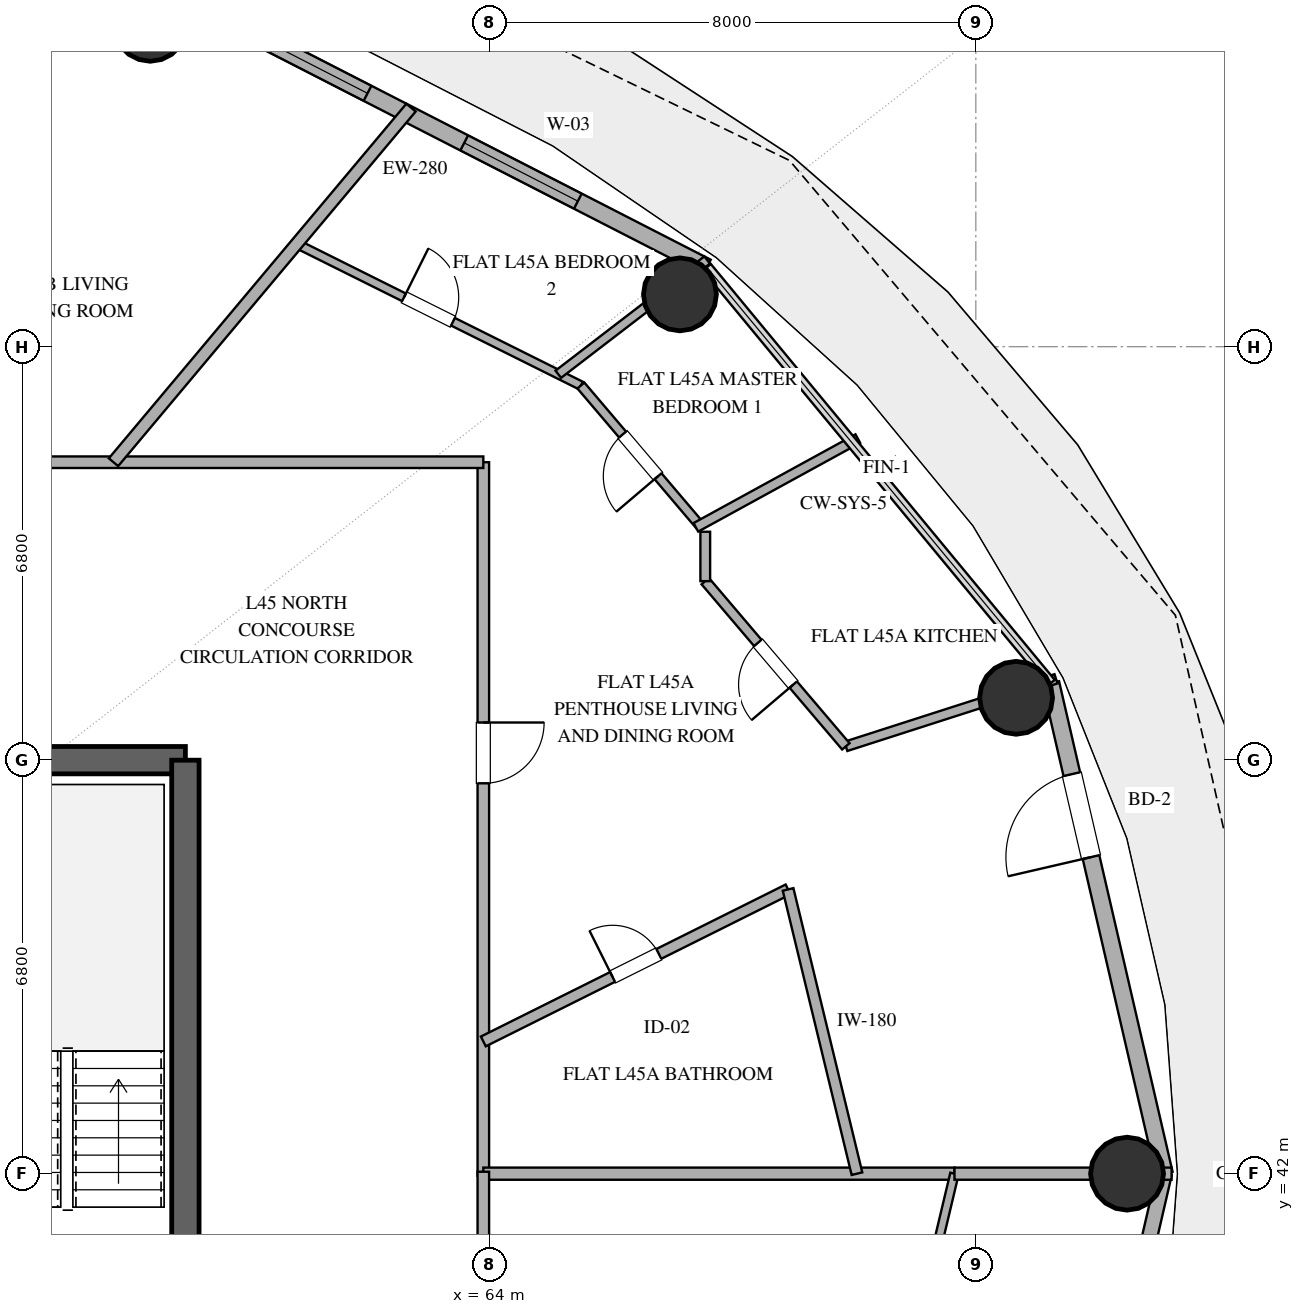
"""IFC4 building model, lengths in metres.
Left out: names, types, materials, properties, quantities, classifications, styles, units other than length and angle.
Written with IfcOpenShell. Run it as: python <this file> out.ifc"""

import sys

from ifc_helpers import new_model, si_unit, direction, frame, frame_2d, origin, origin_2d, place, context, subcontext, project, spatial, rectangle, hollow_circle, extrude, element, fill, save


model = new_model("IFC4")
c1 = context("Model", 3, precision=1e-05, world=origin(), true_north=direction((0.0, 1.0)))
c2 = subcontext(c1, "Body", "Model", "MODEL_VIEW")
j1 = project(units=[si_unit("LENGTHUNIT", "METRE"), si_unit("PLANEANGLEUNIT", "RADIAN")], contexts=[c1])
p1 = place(None, origin())
s1 = spatial("IfcSite", under=j1, at=p1, CompositionType="ELEMENT")
p2 = place(p1, origin())
s2 = spatial("IfcBuilding", under=s1, at=p2, CompositionType="ELEMENT")
p3 = place(p2, frame((0.0, 0.0, 179.4)))
s3 = spatial("IfcBuildingStorey", under=s2, at=p3, CompositionType="ELEMENT", Elevation=179.4)
p4 = place(p3, frame((55.0, 48.8, 0.0), z_axis=(0.0, 0.0, 1.0), x_axis=(1.0, 0.0, 0.0)))
e1 = element("IfcWall", 1, at=p4, inside=s3, PredefinedType="SHEAR", context=c2, shape_type="SweptSolid", body=[
    extrude(rectangle(XDim=4.0, YDim=0.45, at=frame_2d((2.0, 0.0))), origin(), (0.0, 0.0, 1.0), 3.38),
])
p5 = place(p3, frame((59.0, 35.2, 0.0), z_axis=(0.0, 0.0, 1.0), x_axis=(0.0, 1.0, 0.0)))
e2 = element("IfcWall", 2, at=p5, inside=s3, PredefinedType="SHEAR", context=c2, shape_type="SweptSolid", body=[
    extrude(rectangle(XDim=13.6, YDim=0.45, at=frame_2d((6.8, 0.0))), origin(), (0.0, 0.0, 1.0), 3.38),
])
for number, where, z_axis, x_axis in (
    (3, (74.487, 42.0, 0.0), (0.0, 0.0, 1.0), (1.0, 0.0, 0.0)),
    (4, (72.662, 49.826, 0.0), (0.0, 0.0, 1.0), (1.0, 0.0, 0.0)),
    (5, (67.134, 56.46, 0.0), (0.0, 0.0, 1.0), (1.0, 0.0, 0.0)),
    (6, (58.422, 60.893, 0.0), (0.0, 0.0, 1.0), (1.0, 0.0, 0.0)),
):
    element("IfcColumn", number, at=place(p3, frame(where, z_axis=z_axis, x_axis=x_axis)), inside=s3, PredefinedType="COLUMN", context=c2, shape_type="SweptSolid", body=[
        extrude(hollow_circle(Radius=0.6, WallThickness=0.032, at=origin_2d()), origin(), (0.0, 0.0, 1.0), 3.38),
    ])
p6 = place(p3, frame((75.099, 42.0, 0.0), z_axis=(0.0, 0.0, 1.0), x_axis=(-0.225473184558, 0.974249374157, 0.0)))
e7 = element("IfcWall", 7, at=p6, inside=s3, PredefinedType="SOLIDWALL", context=c2, shape_type="SweptSolid", body=[
    extrude(rectangle(XDim=8.28, YDim=0.28, at=frame_2d((4.14, 0.0))), origin(), (0.0, 0.0, 1.0), 3.38),
])
p7 = place(p6, frame((5.344, 0.0, 0.0)))
e8 = element("IfcOpeningElement", 8, at=p7, cuts=e7, PredefinedType="OPENING", context=c2, shape_type="SweptSolid", body=[
    extrude(rectangle(XDim=1.4, YDim=2.2, at=frame_2d((0.7, 1.1))), frame((0.0, 0.15, 0.0), z_axis=(0.0, -1.0, 0.0), x_axis=(1.0, 0.0, 0.0)), (0.0, 0.0, 1.0), 0.3),
])
p8 = place(p3, frame((67.576, 56.906, 0.0), z_axis=(0.0, 0.0, 1.0), x_axis=(-0.889872523182, 0.456209263919, 0.0)))
e9 = element("IfcWall", 9, at=p8, inside=s3, PredefinedType="SOLIDWALL", context=c2, shape_type="SweptSolid", body=[
    extrude(rectangle(XDim=10.016, YDim=0.28, at=frame_2d((5.008, 0.0))), origin(), (0.0, 0.0, 1.0), 3.38),
])
p9 = place(p8, frame((2.384, 0.0, 0.85)))
e10 = element("IfcOpeningElement", 10, at=p9, cuts=e9, PredefinedType="OPENING", context=c2, shape_type="SweptSolid", body=[
    extrude(rectangle(XDim=2.1, YDim=2.2, at=frame_2d((1.05, 1.1))), frame((0.0, 0.15, 0.0), z_axis=(0.0, -1.0, 0.0), x_axis=(1.0, 0.0, 0.0)), (0.0, 0.0, 1.0), 0.3),
])
p10 = place(p8, frame((6.271, 0.0, 0.85)))
e11 = element("IfcOpeningElement", 11, at=p10, cuts=e9, PredefinedType="OPENING", context=c2, shape_type="SweptSolid", body=[
    extrude(rectangle(XDim=1.8, YDim=2.2, at=frame_2d((0.9, 1.1))), frame((0.0, 0.15, 0.0), z_axis=(0.0, -1.0, 0.0), x_axis=(1.0, 0.0, 0.0)), (0.0, 0.0, 1.0), 0.3),
])
p11 = place(p3, frame((73.232, 33.933, 0.0), z_axis=(0.0, 0.0, 1.0), x_axis=(0.225473184558, 0.974249374157, 0.0)))
e12 = element("IfcWall", 12, at=p11, inside=s3, PredefinedType="SOLIDWALL", context=c2, shape_type="SweptSolid", body=[
    extrude(rectangle(XDim=8.28, YDim=0.25, at=frame_2d((4.14, 0.0))), origin(), (0.0, 0.0, 1.0), 3.38),
])
p12 = place(p11, frame((5.481, 0.0, 1.42)))
e13 = element("IfcOpeningElement", 13, at=p12, cuts=e12, PredefinedType="OPENING", context=c2, shape_type="SweptSolid", body=[
    extrude(rectangle(XDim=1.0, YDim=1.05, at=frame_2d((0.5, 0.525))), frame((0.0, 0.135, 0.0), z_axis=(0.0, -1.0, 0.0), x_axis=(1.0, 0.0, 0.0)), (0.0, 0.0, 1.0), 0.27),
])
p13 = place(p3, frame((63.9, 53.7, 0.0), z_axis=(0.0, 0.0, 1.0), x_axis=(0.0, -1.0, 0.0)))
e14 = element("IfcWall", 14, at=p13, inside=s3, PredefinedType="PARTITIONING", context=c2, shape_type="SweptSolid", body=[
    extrude(rectangle(XDim=11.732, YDim=0.19, at=frame_2d((5.866, 0.0))), origin(), (0.0, 0.0, 1.0), 2.74),
])
p14 = place(p13, frame((4.281, 0.0, 0.0)))
e15 = element("IfcOpeningElement", 15, at=p14, cuts=e14, PredefinedType="OPENING", context=c2, shape_type="SweptSolid", body=[
    extrude(rectangle(XDim=1.0, YDim=2.2, at=frame_2d((0.5, 1.1))), frame((0.0, 0.105, 0.0), z_axis=(0.0, -1.0, 0.0), x_axis=(1.0, 0.0, 0.0)), (0.0, 0.0, 1.0), 0.21),
])
p15 = place(p3, frame((48.092, 53.7, 0.0), z_axis=(0.0, 0.0, 1.0), x_axis=(1.0, 0.0, 0.0)))
e16 = element("IfcWall", 16, at=p15, inside=s3, PredefinedType="PARTITIONING", context=c2, shape_type="SweptSolid", body=[
    extrude(rectangle(XDim=15.808, YDim=0.19, at=frame_2d((7.904, 0.0))), origin(), (0.0, 0.0, 1.0), 2.74),
])
p16 = place(p15, frame((6.109, 0.0, 0.0)))
e17 = element("IfcOpeningElement", 17, at=p16, cuts=e16, PredefinedType="OPENING", context=c2, shape_type="SweptSolid", body=[
    extrude(rectangle(XDim=1.0, YDim=2.2, at=frame_2d((0.5, 1.1))), frame((0.0, 0.105, 0.0), z_axis=(0.0, -1.0, 0.0), x_axis=(1.0, 0.0, 0.0)), (0.0, 0.0, 1.0), 0.21),
])
p17 = place(p3, frame((63.9, 42.0, 0.0), z_axis=(0.0, 0.0, 1.0), x_axis=(1.0, 0.0, 0.0)))
e18 = element("IfcWall", 18, at=p17, inside=s3, PredefinedType="PARTITIONING", context=c2, shape_type="SweptSolid", body=[
    extrude(rectangle(XDim=7.749, YDim=0.2, at=frame_2d((3.875, 0.0))), origin(), (0.0, 0.0, 1.0), 2.74),
])
p18 = place(p3, frame((63.9, 42.032, 0.0), z_axis=(0.0, 0.0, 1.0), x_axis=(0.0, -1.0, 0.0)))
e19 = element("IfcWall", 19, at=p18, inside=s3, PredefinedType="PARTITIONING", context=c2, shape_type="SweptSolid", body=[
    extrude(rectangle(XDim=11.732, YDim=0.19, at=frame_2d((5.866, 0.0))), origin(), (0.0, 0.0, 1.0), 2.74),
])
p19 = place(p3, frame((71.649, 42.0, 0.0), z_axis=(0.0, 0.0, 1.0), x_axis=(-0.231658068135, -0.972797275627, 0.0)))
e20 = element("IfcWall", 20, at=p19, inside=s3, PredefinedType="PARTITIONING", context=c2, shape_type="SweptSolid", body=[
    extrude(rectangle(XDim=7.034, YDim=0.14, at=frame_2d((3.517, 0.0))), origin(), (0.0, 0.0, 1.0), 2.74),
])
p20 = place(p19, frame((2.427, 0.0, 0.0)))
e21 = element("IfcOpeningElement", 21, at=p20, cuts=e20, PredefinedType="OPENING", context=c2, shape_type="SweptSolid", body=[
    extrude(rectangle(XDim=0.9, YDim=2.1, at=frame_2d((0.45, 1.05))), frame((0.0, 0.08, 0.0), z_axis=(0.0, -1.0, 0.0), x_axis=(1.0, 0.0, 0.0)), (0.0, 0.0, 1.0), 0.16),
])
p21 = place(p3, frame((63.9, 44.175, 0.0), z_axis=(0.0, 0.0, 1.0), x_axis=(0.894853920946, 0.446359115699, 0.0)))
e22 = element("IfcWall", 22, at=p21, inside=s3, PredefinedType="PLUMBINGWALL", context=c2, shape_type="SweptSolid", body=[
    extrude(rectangle(XDim=5.601, YDim=0.18, at=frame_2d((2.801, 0.0))), origin(), (0.0, 0.0, 1.0), 2.74),
])
p22 = place(p21, frame((2.375, 0.0, 0.0)))
e23 = element("IfcOpeningElement", 23, at=p22, cuts=e22, PredefinedType="OPENING", context=c2, shape_type="SweptSolid", body=[
    extrude(rectangle(XDim=0.85, YDim=2.1, at=frame_2d((0.425, 1.05))), frame((0.0, 0.1, 0.0), z_axis=(0.0, -1.0, 0.0), x_axis=(1.0, 0.0, 0.0)), (0.0, 0.0, 1.0), 0.2),
])
p23 = place(p3, frame((60.831, 57.291, 0.0), z_axis=(0.0, 0.0, 1.0), x_axis=(0.894950159382, -0.446166126261, 0.0)))
e24 = element("IfcWall", 24, at=p23, inside=s3, PredefinedType="PARTITIONING", context=c2, shape_type="SweptSolid", body=[
    extrude(rectangle(XDim=5.222, YDim=0.14, at=frame_2d((2.611, 0.0))), origin(), (0.0, 0.0, 1.0), 2.74),
])
p24 = place(p23, frame((1.971, 0.0, 0.0)))
e25 = element("IfcOpeningElement", 25, at=p24, cuts=e24, PredefinedType="OPENING", context=c2, shape_type="SweptSolid", body=[
    extrude(rectangle(XDim=0.9, YDim=2.1, at=frame_2d((0.45, 1.05))), frame((0.0, 0.08, 0.0), z_axis=(0.0, -1.0, 0.0), x_axis=(1.0, 0.0, 0.0)), (0.0, 0.0, 1.0), 0.16),
])
p25 = place(p3, frame((68.912, 46.675, 0.0), z_axis=(0.0, 0.0, 1.0), x_axis=(0.235459111302, -0.97188425592, 0.0)))
e26 = element("IfcWall", 26, at=p25, inside=s3, PredefinedType="PLUMBINGWALL", context=c2, shape_type="SweptSolid", body=[
    extrude(rectangle(XDim=4.81, YDim=0.18, at=frame_2d((2.405, 0.0))), origin(), (0.0, 0.0, 1.0), 2.74),
])
p26 = place(p3, frame((62.711, 59.531, 0.0), z_axis=(0.0, 0.0, 1.0), x_axis=(-0.642792619699, -0.766040239192, 0.0)))
e27 = element("IfcWall", 27, at=p26, inside=s3, PredefinedType="PARTITIONING", context=c2, shape_type="SweptSolid", body=[
    extrude(rectangle(XDim=7.613, YDim=0.2, at=frame_2d((3.806, 0.0))), origin(), (0.0, 0.0, 1.0), 2.74),
])
p27 = place(p3, frame((73.318, 50.138, 0.0), z_axis=(0.0, 0.0, 1.0), x_axis=(-0.95200546613, -0.306081022703, 0.0)))
e28 = element("IfcWall", 28, at=p27, inside=s3, PredefinedType="PLUMBINGWALL", context=c2, shape_type="SweptSolid", body=[
    extrude(rectangle(XDim=3.63, YDim=0.16, at=frame_2d((1.815, 0.0))), origin(), (0.0, 0.0, 1.0), 2.74),
])
p28 = place(p3, frame((71.649, 42.0, 0.0), z_axis=(0.0, 0.0, 1.0), x_axis=(1.0, 0.0, 0.0)))
e29 = element("IfcWall", 29, at=p28, inside=s3, PredefinedType="PARTITIONING", context=c2, shape_type="SweptSolid", body=[
    extrude(rectangle(XDim=3.571, YDim=0.2, at=frame_2d((1.785, 0.0))), origin(), (0.0, 0.0, 1.0), 2.74),
])
p29 = place(p3, frame((69.862, 49.027, 0.0), z_axis=(0.0, 0.0, 1.0), x_axis=(-0.648065435441, 0.761584658057, 0.0)))
e30 = element("IfcWall", 30, at=p29, inside=s3, PredefinedType="PLUMBINGWALL", context=c2, shape_type="SweptSolid", body=[
    extrude(rectangle(XDim=3.568, YDim=0.16, at=frame_2d((1.784, 0.0))), origin(), (0.0, 0.0, 1.0), 2.74),
])
p30 = place(p29, frame((1.334, 0.0, 0.0)))
e31 = element("IfcOpeningElement", 31, at=p30, cuts=e30, PredefinedType="OPENING", context=c2, shape_type="SweptSolid", body=[
    extrude(rectangle(XDim=0.9, YDim=2.1, at=frame_2d((0.45, 1.05))), frame((0.0, 0.09, 0.0), z_axis=(0.0, -1.0, 0.0), x_axis=(1.0, 0.0, 0.0)), (0.0, 0.0, 1.0), 0.18),
])
p31 = place(p3, frame((67.581, 57.025, 0.0), z_axis=(0.0, 0.0, 1.0), x_axis=(-0.793314658032, -0.608811837395, 0.0)))
e32 = element("IfcWall", 32, at=p31, inside=s3, PredefinedType="PARTITIONING", context=c2, shape_type="SweptSolid", body=[
    extrude(rectangle(XDim=3.086, YDim=0.15, at=frame_2d((1.543, 0.0))), origin(), (0.0, 0.0, 1.0), 2.74),
])
p32 = place(p3, frame((67.459, 52.664, 0.0), z_axis=(0.0, 0.0, 1.0), x_axis=(-0.647859881114, 0.761759525338, 0.0)))
e33 = element("IfcWall", 33, at=p32, inside=s3, PredefinedType="PARTITIONING", context=c2, shape_type="SweptSolid", body=[
    extrude(rectangle(XDim=3.016, YDim=0.15, at=frame_2d((1.508, 0.0))), origin(), (0.0, 0.0, 1.0), 2.74),
])
p33 = place(p32, frame((1.058, 0.0, 0.0)))
e34 = element("IfcOpeningElement", 34, at=p33, cuts=e33, PredefinedType="OPENING", context=c2, shape_type="SweptSolid", body=[
    extrude(rectangle(XDim=0.9, YDim=2.1, at=frame_2d((0.45, 1.05))), frame((0.0, 0.085, 0.0), z_axis=(0.0, -1.0, 0.0), x_axis=(1.0, 0.0, 0.0)), (0.0, 0.0, 1.0), 0.17),
])
p34 = place(p3, frame((67.396, 52.629, 0.0), z_axis=(0.0, 0.0, 1.0), x_axis=(0.876959960956, 0.4805634473, 0.0)))
e35 = element("IfcWall", 35, at=p34, inside=s3, PredefinedType="PLUMBINGWALL", context=c2, shape_type="SweptSolid", body=[
    extrude(rectangle(XDim=3.037, YDim=0.16, at=frame_2d((1.519, 0.0))), origin(), (0.0, 0.0, 1.0), 2.74),
])
p35 = place(p3, frame((67.55, 51.744, 0.0), z_axis=(0.0, 0.0, 1.0), x_axis=(0.0, 1.0, 0.0)))
e36 = element("IfcWall", 36, at=p35, inside=s3, PredefinedType="PLUMBINGWALL", context=c2, shape_type="SweptSolid", body=[
    extrude(rectangle(XDim=0.812, YDim=0.16, at=frame_2d((0.406, 0.0))), origin(), (0.0, 0.0, 1.0), 2.74),
])
p36 = place(p7, origin())
e37 = element("IfcDoor", 37, at=p36, inside=s3, OperationType="SINGLE_SWING_LEFT", PredefinedType="DOOR", context=c2, shape_type="SweptSolid", body=[
    extrude(rectangle(XDim=1.4, YDim=2.2, at=frame_2d((0.7, 1.1))), frame((0.0, 0.025, 0.0), z_axis=(0.0, -1.0, 0.0), x_axis=(1.0, 0.0, 0.0)), (0.0, 0.0, 1.0), 0.05),
])
fill(e8, e37)
p37 = place(p9, origin())
e38 = element("IfcWindow", 38, at=p37, inside=s3, PartitioningType="SINGLE_PANEL", PredefinedType="WINDOW", context=c2, shape_type="SweptSolid", body=[
    extrude(rectangle(XDim=2.1, YDim=2.2, at=frame_2d((1.05, 1.1))), frame((0.0, 0.03, 0.0), z_axis=(0.0, -1.0, 0.0), x_axis=(1.0, 0.0, 0.0)), (0.0, 0.0, 1.0), 0.06),
])
fill(e10, e38)
p38 = place(p10, origin())
e39 = element("IfcWindow", 39, at=p38, inside=s3, PartitioningType="SINGLE_PANEL", PredefinedType="WINDOW", context=c2, shape_type="SweptSolid", body=[
    extrude(rectangle(XDim=1.8, YDim=2.2, at=frame_2d((0.9, 1.1))), frame((0.0, 0.03, 0.0), z_axis=(0.0, -1.0, 0.0), x_axis=(1.0, 0.0, 0.0)), (0.0, 0.0, 1.0), 0.06),
])
fill(e11, e39)
p39 = place(p14, origin())
e40 = element("IfcDoor", 40, at=p39, inside=s3, OperationType="SINGLE_SWING_LEFT", PredefinedType="DOOR", context=c2, shape_type="SweptSolid", body=[
    extrude(rectangle(XDim=1.0, YDim=2.2, at=frame_2d((0.5, 1.1))), frame((0.0, 0.025, 0.0), z_axis=(0.0, -1.0, 0.0), x_axis=(1.0, 0.0, 0.0)), (0.0, 0.0, 1.0), 0.05),
])
fill(e15, e40)
p40 = place(p22, origin())
e41 = element("IfcDoor", 41, at=p40, inside=s3, OperationType="SINGLE_SWING_LEFT", PredefinedType="DOOR", context=c2, shape_type="SweptSolid", body=[
    extrude(rectangle(XDim=0.85, YDim=2.1, at=frame_2d((0.425, 1.05))), frame((0.0, 0.025, 0.0), z_axis=(0.0, -1.0, 0.0), x_axis=(1.0, 0.0, 0.0)), (0.0, 0.0, 1.0), 0.05),
])
fill(e23, e41)
p41 = place(p24, origin())
e42 = element("IfcDoor", 42, at=p41, inside=s3, OperationType="SINGLE_SWING_LEFT", PredefinedType="DOOR", context=c2, shape_type="SweptSolid", body=[
    extrude(rectangle(XDim=0.9, YDim=2.1, at=frame_2d((0.45, 1.05))), frame((0.0, 0.025, 0.0), z_axis=(0.0, -1.0, 0.0), x_axis=(1.0, 0.0, 0.0)), (0.0, 0.0, 1.0), 0.05),
])
fill(e25, e42)
p42 = place(p30, origin())
e43 = element("IfcDoor", 43, at=p42, inside=s3, OperationType="SINGLE_SWING_LEFT", PredefinedType="DOOR", context=c2, shape_type="SweptSolid", body=[
    extrude(rectangle(XDim=0.9, YDim=2.1, at=frame_2d((0.45, 1.05))), frame((0.0, 0.025, 0.0), z_axis=(0.0, -1.0, 0.0), x_axis=(1.0, 0.0, 0.0)), (0.0, 0.0, 1.0), 0.05),
])
fill(e31, e43)
p43 = place(p33, origin())
e44 = element("IfcDoor", 44, at=p43, inside=s3, OperationType="SINGLE_SWING_LEFT", PredefinedType="DOOR", context=c2, shape_type="SweptSolid", body=[
    extrude(rectangle(XDim=0.9, YDim=2.1, at=frame_2d((0.45, 1.05))), frame((0.0, 0.025, 0.0), z_axis=(0.0, -1.0, 0.0), x_axis=(1.0, 0.0, 0.0)), (0.0, 0.0, 1.0), 0.05),
])
fill(e34, e44)
save(model, sys.argv[1])
